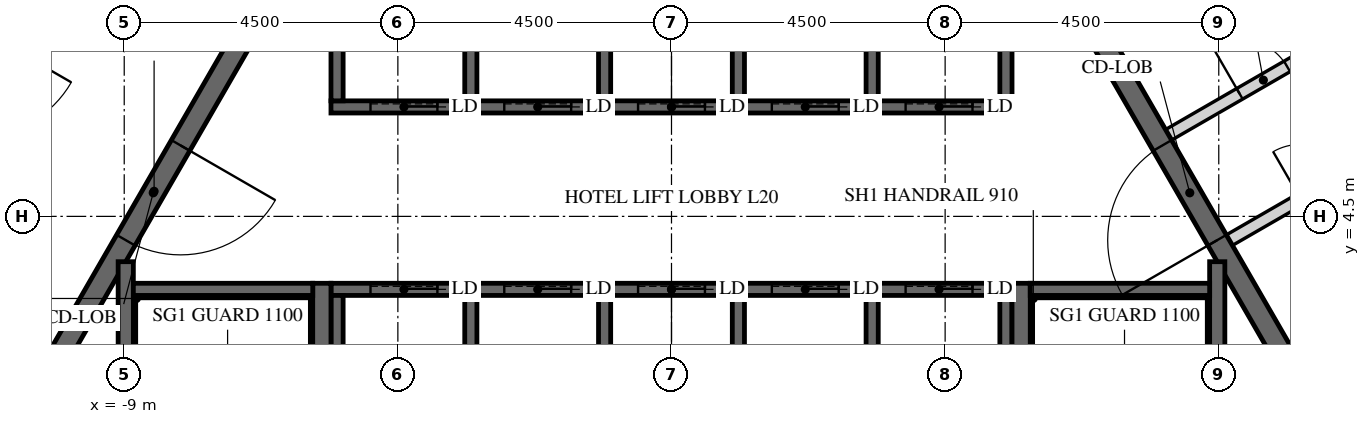
"""IFC4 building model, lengths in metres.
Left out: names, types, materials, properties, quantities, classifications, styles, units other than length and angle.
Written with IfcOpenShell. Run it as: python <this file> out.ifc"""

import sys

from ifc_helpers import new_model, si_unit, direction, frame, frame_2d, origin, place, context, subcontext, project, spatial, polyline, rectangle, outline, extrude, element, fill, save


model = new_model("IFC4")
c1 = context("Model", 3, precision=1e-05, world=origin(), true_north=direction((0.0, 1.0)))
c2 = subcontext(c1, "Body", "Model", "MODEL_VIEW")
j1 = project(units=[si_unit("LENGTHUNIT", "METRE"), si_unit("PLANEANGLEUNIT", "RADIAN")], contexts=[c1])
p1 = place(None, origin())
s1 = spatial("IfcSite", under=j1, at=p1, CompositionType="ELEMENT")
p2 = place(p1, origin())
s2 = spatial("IfcBuilding", under=s1, at=p2, CompositionType="ELEMENT")
p3 = place(p2, frame((0.0, 0.0, 92.1)))
s3 = spatial("IfcBuildingStorey", under=s2, at=p3, CompositionType="ELEMENT", Elevation=92.1)
p4 = place(p3, frame((-7.91, 13.7, -0.15), z_axis=(0.0, 0.0, 1.0), x_axis=(-0.499999880136, -0.866025472988, 0.0)))
e1 = element("IfcWall", 1, at=p4, inside=s3, PredefinedType="SHEAR", context=c2, shape_type="SweptSolid", body=[
    extrude(outline(polyline([(-0.173, -0.3), (15.993, -0.3), (15.646, 0.3), (0.173, 0.3), (-0.173, -0.3)])), origin(), (0.0, 0.0, 1.0), 3.9),
])
p5 = place(p4, frame((7.039, 0.0, 0.15)))
e2 = element("IfcOpeningElement", 2, at=p5, cuts=e1, PredefinedType="OPENING", context=c2, shape_type="SweptSolid", body=[
    extrude(rectangle(XDim=1.8, YDim=2.4, at=frame_2d((0.9, 1.2))), frame((0.0, 0.31, 0.0), z_axis=(0.0, -1.0, 0.0), x_axis=(1.0, 0.0, 0.0)), (0.0, 0.0, 1.0), 0.62),
])
p6 = place(p3, frame((15.819, 0.0, -0.15), z_axis=(0.0, 0.0, 1.0), x_axis=(-0.499999880136, 0.866025472988, 0.0)))
e3 = element("IfcWall", 3, at=p6, inside=s3, PredefinedType="SHEAR", context=c2, shape_type="SweptSolid", body=[
    extrude(outline(polyline([(-0.173, -0.3), (15.993, -0.3), (15.646, 0.3), (0.173, 0.3), (-0.173, -0.3)])), origin(), (0.0, 0.0, 1.0), 3.9),
])
p7 = place(p6, frame((6.981, 0.0, 0.15)))
e4 = element("IfcOpeningElement", 4, at=p7, cuts=e3, PredefinedType="OPENING", context=c2, shape_type="SweptSolid", body=[
    extrude(rectangle(XDim=1.8, YDim=2.4, at=frame_2d((0.9, 1.2))), frame((0.0, 0.31, 0.0), z_axis=(0.0, -1.0, 0.0), x_axis=(1.0, 0.0, 0.0)), (0.0, 0.0, 1.0), 0.62),
])
p8 = place(p3, frame((-5.673, 9.825, -0.15), z_axis=(0.0, 0.0, 1.0), x_axis=(-0.499995046907, -0.866028263435, 0.0)))
e5 = element("IfcWall", 5, at=p8, inside=s3, PredefinedType="SHEAR", context=c2, shape_type="SweptSolid", body=[
    extrude(outline(polyline([(-0.101, -0.175), (11.446, -0.175), (11.244, 0.175), (0.101, 0.175), (-0.101, -0.175)])), origin(), (0.0, 0.0, 1.0), 3.9),
])
p9 = place(p8, frame((4.801, 0.0, 0.15)))
e6 = element("IfcOpeningElement", 6, at=p9, cuts=e5, PredefinedType="OPENING", context=c2, shape_type="SweptSolid", body=[
    extrude(rectangle(XDim=1.8, YDim=2.4, at=frame_2d((0.9, 1.2))), frame((0.0, 0.185, 0.0), z_axis=(0.0, -1.0, 0.0), x_axis=(1.0, 0.0, 0.0)), (0.0, 0.0, 1.0), 0.37),
])
p10 = place(p3, frame((11.345, 0.0, -0.15), z_axis=(0.0, 0.0, 1.0), x_axis=(-0.499995046907, 0.866028263435, 0.0)))
e7 = element("IfcWall", 7, at=p10, inside=s3, PredefinedType="SHEAR", context=c2, shape_type="SweptSolid", body=[
    extrude(outline(polyline([(-0.101, -0.175), (11.446, -0.175), (11.244, 0.175), (0.101, 0.175), (-0.101, -0.175)])), origin(), (0.0, 0.0, 1.0), 3.9),
])
p11 = place(p10, frame((4.744, 0.0, 0.15)))
e8 = element("IfcOpeningElement", 8, at=p11, cuts=e7, PredefinedType="OPENING", context=c2, shape_type="SweptSolid", body=[
    extrude(rectangle(XDim=1.8, YDim=2.4, at=frame_2d((0.9, 1.2))), frame((0.0, 0.185, 0.0), z_axis=(0.0, -1.0, 0.0), x_axis=(1.0, 0.0, 0.0)), (0.0, 0.0, 1.0), 0.37),
])
p12 = place(p3, frame((-5.6, 6.3, -0.25), z_axis=(0.0, 0.0, 1.0), x_axis=(1.0, 0.0, 0.0)))
e9 = element("IfcWall", 9, at=p12, inside=s3, PredefinedType="SHEAR", context=c2, shape_type="SweptSolid", body=[
    extrude(rectangle(XDim=11.2, YDim=0.2, at=frame_2d((5.6, 0.0))), origin(), (0.0, 0.0, 1.0), 3.9),
])
p13 = place(p12, frame((0.65, 0.0, 0.25)))
e10 = element("IfcOpeningElement", 10, at=p13, cuts=e9, PredefinedType="OPENING", context=c2, shape_type="SweptSolid", body=[
    extrude(rectangle(XDim=1.1, YDim=2.1, at=frame_2d((0.55, 1.05))), frame((0.0, 0.11, 0.0), z_axis=(0.0, -1.0, 0.0), x_axis=(1.0, 0.0, 0.0)), (0.0, 0.0, 1.0), 0.22),
])
p14 = place(p12, frame((2.85, 0.0, 0.25)))
e11 = element("IfcOpeningElement", 11, at=p14, cuts=e9, PredefinedType="OPENING", context=c2, shape_type="SweptSolid", body=[
    extrude(rectangle(XDim=1.1, YDim=2.1, at=frame_2d((0.55, 1.05))), frame((0.0, 0.11, 0.0), z_axis=(0.0, -1.0, 0.0), x_axis=(1.0, 0.0, 0.0)), (0.0, 0.0, 1.0), 0.22),
])
p15 = place(p12, frame((5.05, 0.0, 0.25)))
e12 = element("IfcOpeningElement", 12, at=p15, cuts=e9, PredefinedType="OPENING", context=c2, shape_type="SweptSolid", body=[
    extrude(rectangle(XDim=1.1, YDim=2.1, at=frame_2d((0.55, 1.05))), frame((0.0, 0.11, 0.0), z_axis=(0.0, -1.0, 0.0), x_axis=(1.0, 0.0, 0.0)), (0.0, 0.0, 1.0), 0.22),
])
p16 = place(p12, frame((7.25, 0.0, 0.25)))
e13 = element("IfcOpeningElement", 13, at=p16, cuts=e9, PredefinedType="OPENING", context=c2, shape_type="SweptSolid", body=[
    extrude(rectangle(XDim=1.1, YDim=2.1, at=frame_2d((0.55, 1.05))), frame((0.0, 0.11, 0.0), z_axis=(0.0, -1.0, 0.0), x_axis=(1.0, 0.0, 0.0)), (0.0, 0.0, 1.0), 0.22),
])
p17 = place(p12, frame((9.45, 0.0, 0.25)))
e14 = element("IfcOpeningElement", 14, at=p17, cuts=e9, PredefinedType="OPENING", context=c2, shape_type="SweptSolid", body=[
    extrude(rectangle(XDim=1.1, YDim=2.1, at=frame_2d((0.55, 1.05))), frame((0.0, 0.11, 0.0), z_axis=(0.0, -1.0, 0.0), x_axis=(1.0, 0.0, 0.0)), (0.0, 0.0, 1.0), 0.22),
])
for number, where, z_axis, x_axis in (
    (15, (-5.5, 6.4, -0.25), (0.0, 0.0, 1.0), (0.0, 1.0, 0.0)),
    (16, (-3.3, 6.4, -0.25), (0.0, 0.0, 1.0), (0.0, 1.0, 0.0)),
    (17, (-1.1, 6.4, -0.25), (0.0, 0.0, 1.0), (0.0, 1.0, 0.0)),
    (18, (1.1, 6.4, -0.25), (0.0, 0.0, 1.0), (0.0, 1.0, 0.0)),
    (19, (3.3, 6.4, -0.25), (0.0, 0.0, 1.0), (0.0, 1.0, 0.0)),
    (20, (5.5, 6.4, -0.25), (0.0, 0.0, 1.0), (0.0, 1.0, 0.0)),
):
    element("IfcWall", number, at=place(p3, frame(where, z_axis=z_axis, x_axis=x_axis)), inside=s3, PredefinedType="SHEAR", context=c2, shape_type="SweptSolid", body=[
        extrude(rectangle(XDim=2.9, YDim=0.2, at=frame_2d((1.45, 0.0))), origin(), (0.0, 0.0, 1.0), 3.9),
    ])
p18 = place(p3, frame((-5.6, 3.3, -0.25), z_axis=(0.0, 0.0, 1.0), x_axis=(1.0, 0.0, 0.0)))
e21 = element("IfcWall", 21, at=p18, inside=s3, PredefinedType="SHEAR", context=c2, shape_type="SweptSolid", body=[
    extrude(rectangle(XDim=11.2, YDim=0.2, at=frame_2d((5.6, 0.0))), origin(), (0.0, 0.0, 1.0), 3.9),
])
p19 = place(p18, frame((0.65, 0.0, 0.25)))
e22 = element("IfcOpeningElement", 22, at=p19, cuts=e21, PredefinedType="OPENING", context=c2, shape_type="SweptSolid", body=[
    extrude(rectangle(XDim=1.1, YDim=2.1, at=frame_2d((0.55, 1.05))), frame((0.0, 0.11, 0.0), z_axis=(0.0, -1.0, 0.0), x_axis=(1.0, 0.0, 0.0)), (0.0, 0.0, 1.0), 0.22),
])
p20 = place(p18, frame((2.85, 0.0, 0.25)))
e23 = element("IfcOpeningElement", 23, at=p20, cuts=e21, PredefinedType="OPENING", context=c2, shape_type="SweptSolid", body=[
    extrude(rectangle(XDim=1.1, YDim=2.1, at=frame_2d((0.55, 1.05))), frame((0.0, 0.11, 0.0), z_axis=(0.0, -1.0, 0.0), x_axis=(1.0, 0.0, 0.0)), (0.0, 0.0, 1.0), 0.22),
])
p21 = place(p18, frame((5.05, 0.0, 0.25)))
e24 = element("IfcOpeningElement", 24, at=p21, cuts=e21, PredefinedType="OPENING", context=c2, shape_type="SweptSolid", body=[
    extrude(rectangle(XDim=1.1, YDim=2.1, at=frame_2d((0.55, 1.05))), frame((0.0, 0.11, 0.0), z_axis=(0.0, -1.0, 0.0), x_axis=(1.0, 0.0, 0.0)), (0.0, 0.0, 1.0), 0.22),
])
p22 = place(p18, frame((7.25, 0.0, 0.25)))
e25 = element("IfcOpeningElement", 25, at=p22, cuts=e21, PredefinedType="OPENING", context=c2, shape_type="SweptSolid", body=[
    extrude(rectangle(XDim=1.1, YDim=2.1, at=frame_2d((0.55, 1.05))), frame((0.0, 0.11, 0.0), z_axis=(0.0, -1.0, 0.0), x_axis=(1.0, 0.0, 0.0)), (0.0, 0.0, 1.0), 0.22),
])
p23 = place(p18, frame((9.45, 0.0, 0.25)))
e26 = element("IfcOpeningElement", 26, at=p23, cuts=e21, PredefinedType="OPENING", context=c2, shape_type="SweptSolid", body=[
    extrude(rectangle(XDim=1.1, YDim=2.1, at=frame_2d((0.55, 1.05))), frame((0.0, 0.11, 0.0), z_axis=(0.0, -1.0, 0.0), x_axis=(1.0, 0.0, 0.0)), (0.0, 0.0, 1.0), 0.22),
])
for number, where, z_axis, x_axis in (
    (27, (-5.5, 0.1, -0.25), (0.0, 0.0, 1.0), (0.0, 1.0, 0.0)),
    (28, (-3.3, 0.1, -0.25), (0.0, 0.0, 1.0), (0.0, 1.0, 0.0)),
    (29, (-1.1, 0.1, -0.25), (0.0, 0.0, 1.0), (0.0, 1.0, 0.0)),
    (30, (1.1, 0.1, -0.25), (0.0, 0.0, 1.0), (0.0, 1.0, 0.0)),
    (31, (3.3, 0.1, -0.25), (0.0, 0.0, 1.0), (0.0, 1.0, 0.0)),
    (32, (5.5, 0.1, -0.25), (0.0, 0.0, 1.0), (0.0, 1.0, 0.0)),
):
    element("IfcWall", number, at=place(p3, frame(where, z_axis=z_axis, x_axis=x_axis)), inside=s3, PredefinedType="SHEAR", context=c2, shape_type="SweptSolid", body=[
        extrude(rectangle(XDim=3.1, YDim=0.2, at=frame_2d((1.55, 0.0))), origin(), (0.0, 0.0, 1.0), 3.9),
    ])
p24 = place(p3, frame((8.175, 5.841, 0.0), z_axis=(0.0, 0.0, 1.0), x_axis=(0.866020560687, 0.500008388397, 0.0)))
e33 = element("IfcWall", 33, at=p24, inside=s3, PredefinedType="PARTITIONING", context=c2, shape_type="SweptSolid", body=[
    extrude(rectangle(XDim=3.4, YDim=0.2, at=frame_2d((1.7, 0.0))), origin(), (0.0, 0.0, 1.0), 3.65),
])
p25 = place(p24, frame((1.35, 0.0, 0.0)))
e34 = element("IfcOpeningElement", 34, at=p25, cuts=e33, PredefinedType="OPENING", context=c2, shape_type="SweptSolid", body=[
    extrude(rectangle(XDim=0.9, YDim=2.1, at=frame_2d((0.45, 1.05))), frame((0.0, 0.11, 0.0), z_axis=(0.0, -1.0, 0.0), x_axis=(1.0, 0.0, 0.0)), (0.0, 0.0, 1.0), 0.22),
])
p26 = place(p3, frame((9.175, 4.109, 0.0), z_axis=(0.0, 0.0, 1.0), x_axis=(0.865989465428, 0.500062241894, 0.0)))
e35 = element("IfcWall", 35, at=p26, inside=s3, PredefinedType="PARTITIONING", context=c2, shape_type="SweptSolid", body=[
    extrude(rectangle(XDim=3.4, YDim=0.2, at=frame_2d((1.7, 0.0))), origin(), (0.0, 0.0, 1.0), 3.65),
])
p27 = place(p26, frame((1.351, 0.0, 0.0)))
e36 = element("IfcOpeningElement", 36, at=p27, cuts=e35, PredefinedType="OPENING", context=c2, shape_type="SweptSolid", body=[
    extrude(rectangle(XDim=0.9, YDim=2.1, at=frame_2d((0.45, 1.05))), frame((0.0, 0.11, 0.0), z_axis=(0.0, -1.0, 0.0), x_axis=(1.0, 0.0, 0.0)), (0.0, 0.0, 1.0), 0.22),
])
p28 = place(p3, frame((5.75, -3.4, -0.25), z_axis=(0.0, 0.0, 1.0), x_axis=(0.0, 1.0, 0.0)))
e37 = element("IfcWall", 37, at=p28, inside=s3, PredefinedType="SHEAR", context=c2, shape_type="SweptSolid", body=[
    extrude(rectangle(XDim=6.8, YDim=0.3, at=frame_2d((3.4, 0.0))), origin(), (0.0, 0.0, 1.0), 3.9),
])
p29 = place(p3, frame((8.975, -3.755, -0.25), z_axis=(0.0, 0.0, 1.0), x_axis=(0.0, 1.0, 0.0)))
e38 = element("IfcWall", 38, at=p29, inside=s3, PredefinedType="SHEAR", context=c2, shape_type="SweptSolid", body=[
    extrude(rectangle(XDim=7.51, YDim=0.25, at=frame_2d((3.755, 0.0))), origin(), (0.0, 0.0, 1.0), 3.9),
])
p30 = place(p3, frame((5.9, 3.3, -0.25), z_axis=(0.0, 0.0, 1.0), x_axis=(1.0, 0.0, 0.0)))
e39 = element("IfcWall", 39, at=p30, inside=s3, PredefinedType="SHEAR", context=c2, shape_type="SweptSolid", body=[
    extrude(rectangle(XDim=2.95, YDim=0.2, at=frame_2d((1.475, 0.0))), origin(), (0.0, 0.0, 1.0), 3.9),
])
p31 = place(p3, frame((-5.75, -3.4, -0.25), z_axis=(0.0, 0.0, 1.0), x_axis=(0.0, 1.0, 0.0)))
e40 = element("IfcWall", 40, at=p31, inside=s3, PredefinedType="SHEAR", context=c2, shape_type="SweptSolid", body=[
    extrude(rectangle(XDim=6.8, YDim=0.3, at=frame_2d((3.4, 0.0))), origin(), (0.0, 0.0, 1.0), 3.9),
])
p32 = place(p3, frame((-8.975, -3.755, -0.25), z_axis=(0.0, 0.0, 1.0), x_axis=(0.0, 1.0, 0.0)))
e41 = element("IfcWall", 41, at=p32, inside=s3, PredefinedType="SHEAR", context=c2, shape_type="SweptSolid", body=[
    extrude(rectangle(XDim=7.51, YDim=0.25, at=frame_2d((3.755, 0.0))), origin(), (0.0, 0.0, 1.0), 3.9),
])
p33 = place(p3, frame((-8.85, 3.3, -0.25), z_axis=(0.0, 0.0, 1.0), x_axis=(1.0, 0.0, 0.0)))
e42 = element("IfcWall", 42, at=p33, inside=s3, PredefinedType="SHEAR", context=c2, shape_type="SweptSolid", body=[
    extrude(rectangle(XDim=2.95, YDim=0.2, at=frame_2d((1.475, 0.0))), origin(), (0.0, 0.0, 1.0), 3.9),
])
p34 = place(p9, origin())
e43 = element("IfcDoor", 43, at=p34, inside=s3, OperationType="DOUBLE_DOOR_SINGLE_SWING", PredefinedType="DOOR", context=c2, shape_type="SweptSolid", body=[
    extrude(rectangle(XDim=1.8, YDim=2.4, at=frame_2d((0.9, 1.2))), frame((0.0, 0.025, 0.0), z_axis=(0.0, -1.0, 0.0), x_axis=(1.0, 0.0, 0.0)), (0.0, 0.0, 1.0), 0.05),
])
fill(e6, e43)
p35 = place(p11, origin())
e44 = element("IfcDoor", 44, at=p35, inside=s3, OperationType="DOUBLE_DOOR_SINGLE_SWING", PredefinedType="DOOR", context=c2, shape_type="SweptSolid", body=[
    extrude(rectangle(XDim=1.8, YDim=2.4, at=frame_2d((0.9, 1.2))), frame((0.0, 0.025, 0.0), z_axis=(0.0, -1.0, 0.0), x_axis=(1.0, 0.0, 0.0)), (0.0, 0.0, 1.0), 0.05),
])
fill(e8, e44)
p36 = place(p25, origin())
e45 = element("IfcDoor", 45, at=p36, inside=s3, OperationType="SINGLE_SWING_LEFT", PredefinedType="DOOR", context=c2, shape_type="SweptSolid", body=[
    extrude(rectangle(XDim=0.9, YDim=2.1, at=frame_2d((0.45, 1.05))), frame((0.0, 0.025, 0.0), z_axis=(0.0, -1.0, 0.0), x_axis=(1.0, 0.0, 0.0)), (0.0, 0.0, 1.0), 0.05),
])
fill(e34, e45)
p37 = place(p13, origin())
e46 = element("IfcDoor", 46, at=p37, inside=s3, OperationType="SLIDING_TO_LEFT", PredefinedType="DOOR", context=c2, shape_type="SweptSolid", body=[
    extrude(rectangle(XDim=1.1, YDim=2.1, at=frame_2d((0.55, 1.05))), frame((0.0, 0.025, 0.0), z_axis=(0.0, -1.0, 0.0), x_axis=(1.0, 0.0, 0.0)), (0.0, 0.0, 1.0), 0.05),
])
fill(e10, e46)
p38 = place(p14, origin())
e47 = element("IfcDoor", 47, at=p38, inside=s3, OperationType="SLIDING_TO_LEFT", PredefinedType="DOOR", context=c2, shape_type="SweptSolid", body=[
    extrude(rectangle(XDim=1.1, YDim=2.1, at=frame_2d((0.55, 1.05))), frame((0.0, 0.025, 0.0), z_axis=(0.0, -1.0, 0.0), x_axis=(1.0, 0.0, 0.0)), (0.0, 0.0, 1.0), 0.05),
])
fill(e11, e47)
p39 = place(p15, origin())
e48 = element("IfcDoor", 48, at=p39, inside=s3, OperationType="SLIDING_TO_LEFT", PredefinedType="DOOR", context=c2, shape_type="SweptSolid", body=[
    extrude(rectangle(XDim=1.1, YDim=2.1, at=frame_2d((0.55, 1.05))), frame((0.0, 0.025, 0.0), z_axis=(0.0, -1.0, 0.0), x_axis=(1.0, 0.0, 0.0)), (0.0, 0.0, 1.0), 0.05),
])
fill(e12, e48)
p40 = place(p16, origin())
e49 = element("IfcDoor", 49, at=p40, inside=s3, OperationType="SLIDING_TO_LEFT", PredefinedType="DOOR", context=c2, shape_type="SweptSolid", body=[
    extrude(rectangle(XDim=1.1, YDim=2.1, at=frame_2d((0.55, 1.05))), frame((0.0, 0.025, 0.0), z_axis=(0.0, -1.0, 0.0), x_axis=(1.0, 0.0, 0.0)), (0.0, 0.0, 1.0), 0.05),
])
fill(e13, e49)
p41 = place(p17, origin())
e50 = element("IfcDoor", 50, at=p41, inside=s3, OperationType="SLIDING_TO_LEFT", PredefinedType="DOOR", context=c2, shape_type="SweptSolid", body=[
    extrude(rectangle(XDim=1.1, YDim=2.1, at=frame_2d((0.55, 1.05))), frame((0.0, 0.025, 0.0), z_axis=(0.0, -1.0, 0.0), x_axis=(1.0, 0.0, 0.0)), (0.0, 0.0, 1.0), 0.05),
])
fill(e14, e50)
p42 = place(p19, origin())
e51 = element("IfcDoor", 51, at=p42, inside=s3, OperationType="SLIDING_TO_LEFT", PredefinedType="DOOR", context=c2, shape_type="SweptSolid", body=[
    extrude(rectangle(XDim=1.1, YDim=2.1, at=frame_2d((0.55, 1.05))), frame((0.0, 0.025, 0.0), z_axis=(0.0, -1.0, 0.0), x_axis=(1.0, 0.0, 0.0)), (0.0, 0.0, 1.0), 0.05),
])
fill(e22, e51)
p43 = place(p20, origin())
e52 = element("IfcDoor", 52, at=p43, inside=s3, OperationType="SLIDING_TO_LEFT", PredefinedType="DOOR", context=c2, shape_type="SweptSolid", body=[
    extrude(rectangle(XDim=1.1, YDim=2.1, at=frame_2d((0.55, 1.05))), frame((0.0, 0.025, 0.0), z_axis=(0.0, -1.0, 0.0), x_axis=(1.0, 0.0, 0.0)), (0.0, 0.0, 1.0), 0.05),
])
fill(e23, e52)
p44 = place(p21, origin())
e53 = element("IfcDoor", 53, at=p44, inside=s3, OperationType="SLIDING_TO_LEFT", PredefinedType="DOOR", context=c2, shape_type="SweptSolid", body=[
    extrude(rectangle(XDim=1.1, YDim=2.1, at=frame_2d((0.55, 1.05))), frame((0.0, 0.025, 0.0), z_axis=(0.0, -1.0, 0.0), x_axis=(1.0, 0.0, 0.0)), (0.0, 0.0, 1.0), 0.05),
])
fill(e24, e53)
p45 = place(p22, origin())
e54 = element("IfcDoor", 54, at=p45, inside=s3, OperationType="SLIDING_TO_LEFT", PredefinedType="DOOR", context=c2, shape_type="SweptSolid", body=[
    extrude(rectangle(XDim=1.1, YDim=2.1, at=frame_2d((0.55, 1.05))), frame((0.0, 0.025, 0.0), z_axis=(0.0, -1.0, 0.0), x_axis=(1.0, 0.0, 0.0)), (0.0, 0.0, 1.0), 0.05),
])
fill(e25, e54)
p46 = place(p23, origin())
e55 = element("IfcDoor", 55, at=p46, inside=s3, OperationType="SLIDING_TO_LEFT", PredefinedType="DOOR", context=c2, shape_type="SweptSolid", body=[
    extrude(rectangle(XDim=1.1, YDim=2.1, at=frame_2d((0.55, 1.05))), frame((0.0, 0.025, 0.0), z_axis=(0.0, -1.0, 0.0), x_axis=(1.0, 0.0, 0.0)), (0.0, 0.0, 1.0), 0.05),
])
fill(e26, e55)
save(model, sys.argv[1])
